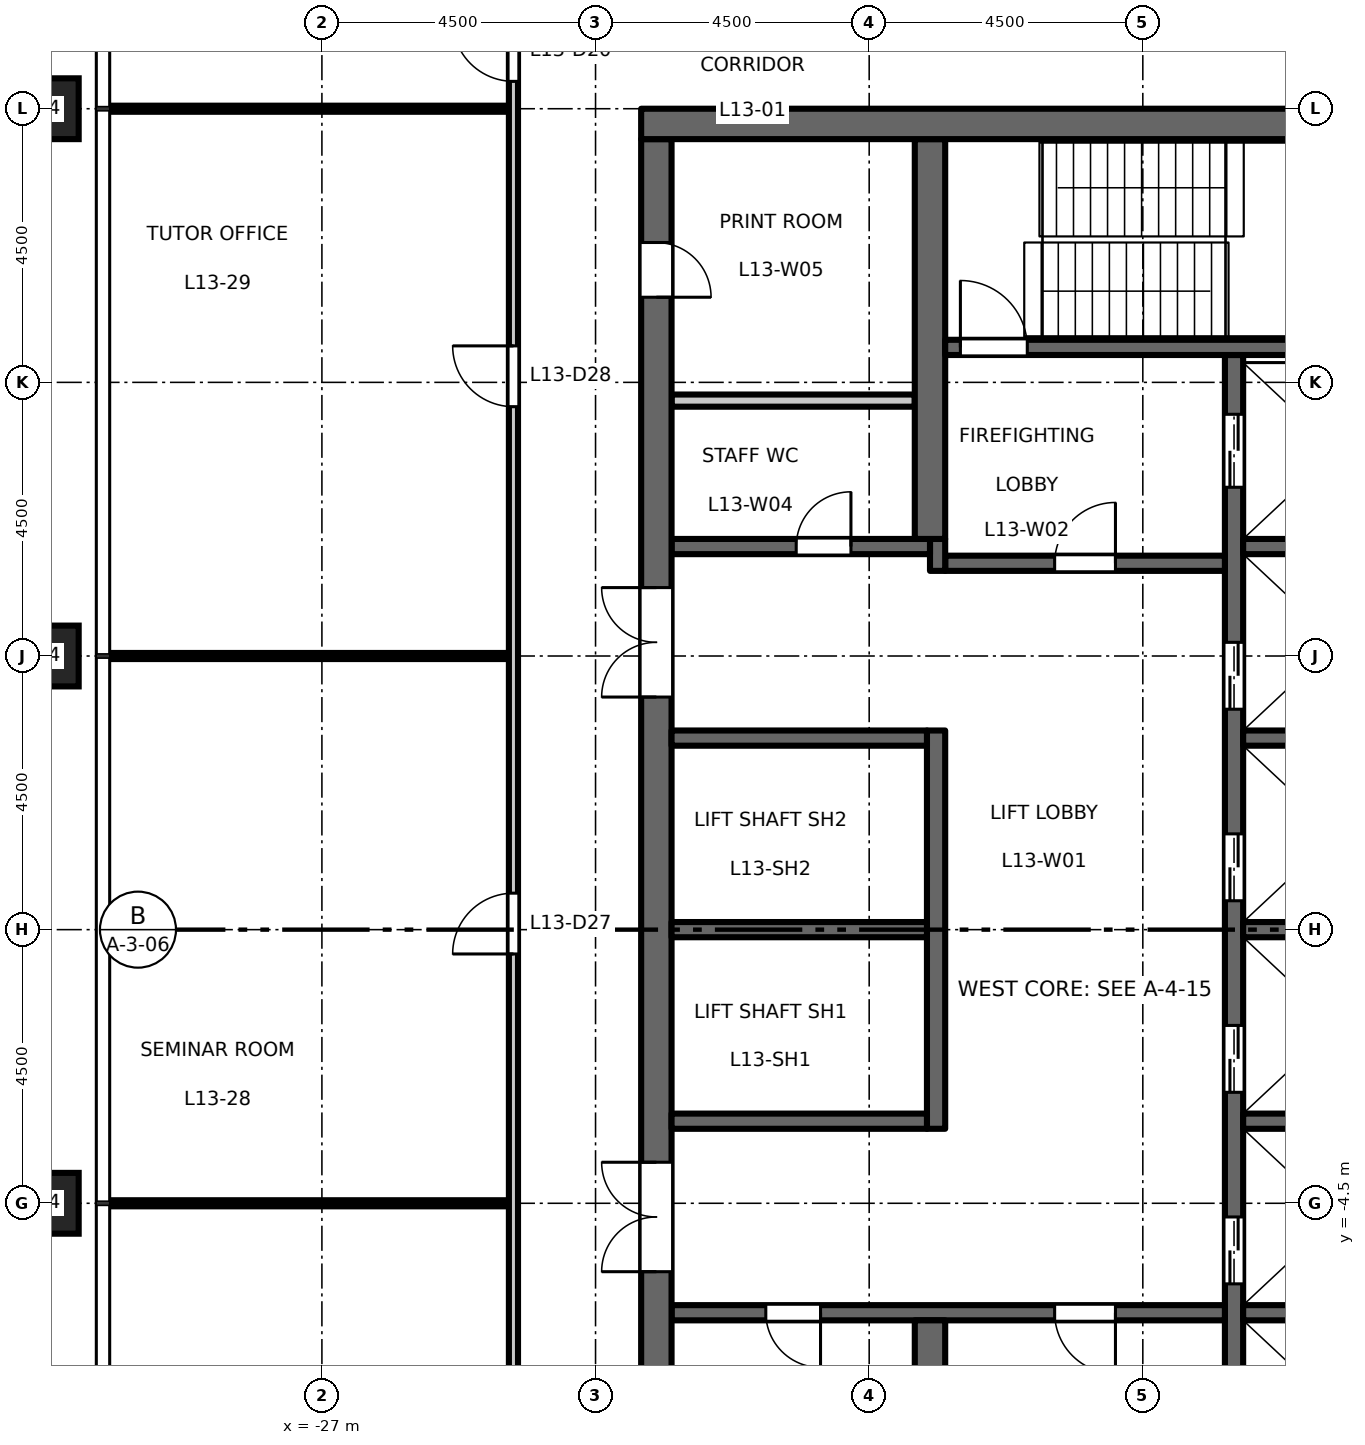
"""IFC4 building model, lengths in metres.
Left out: names, types, materials, properties, quantities, classifications, styles, units other than length and angle.
Written with IfcOpenShell. Run it as: python <this file> out.ifc"""

import sys

from ifc_helpers import new_model, si_unit, direction, frame, frame_2d, origin, origin_2d, place, context, subcontext, project, spatial, rectangle, hollow_rectangle, extrude, element, fill, save


model = new_model("IFC4")
c1 = context("Model", 3, precision=1e-05, world=origin(), true_north=direction((0.0, 1.0)))
c2 = subcontext(c1, "Body", "Model", "MODEL_VIEW")
j1 = project(units=[si_unit("LENGTHUNIT", "METRE"), si_unit("PLANEANGLEUNIT", "RADIAN")], contexts=[c1])
p1 = place(None, origin())
s1 = spatial("IfcSite", under=j1, at=p1, CompositionType="ELEMENT")
p2 = place(p1, origin())
s2 = spatial("IfcBuilding", under=s1, at=p2, CompositionType="ELEMENT")
p3 = place(p2, frame((0.0, 0.0, 62.7)))
s3 = spatial("IfcBuildingStorey", under=s2, at=p3, CompositionType="ELEMENT", Elevation=62.7)
for number, where, z_axis, x_axis in (
    (1, (-31.5, 13.5, 0.0), (0.0, 0.0, 1.0), (1.0, 0.0, 0.0)),
    (2, (-31.5, 4.5, 0.0), (0.0, 0.0, 1.0), (1.0, 0.0, 0.0)),
    (3, (-31.5, -4.5, 0.0), (0.0, 0.0, 1.0), (1.0, 0.0, 0.0)),
):
    element("IfcColumn", number, at=place(p3, frame(where, z_axis=z_axis, x_axis=x_axis)), inside=s3, PredefinedType="COLUMN", context=c2, shape_type="SweptSolid", body=[
        extrude(hollow_rectangle(XDim=1.0, YDim=1.0, WallThickness=0.06, at=origin_2d()), origin(), (0.0, 0.0, 1.0), 4.5),
    ])
p4 = place(p3, frame((-12.0, -9.45, 0.0), z_axis=(0.0, 0.0, 1.0), x_axis=(0.0, 1.0, 0.0)))
e4 = element("IfcWall", 4, at=p4, inside=s3, PredefinedType="SHEAR", context=c2, shape_type="SweptSolid", body=[
    extrude(rectangle(XDim=18.9, YDim=0.3, at=frame_2d((9.45, 0.0))), origin(), (0.0, 0.0, 1.0), 4.35),
])
p5 = place(p4, frame((3.625, 0.0, 0.0)))
e5 = element("IfcOpeningElement", 5, at=p5, cuts=e4, PredefinedType="OPENING", context=c2, shape_type="SweptSolid", body=[
    extrude(rectangle(XDim=1.1, YDim=2.1, at=frame_2d((0.55, 1.05))), frame((0.0, 0.16, 0.0), z_axis=(0.0, -1.0, 0.0), x_axis=(1.0, 0.0, 0.0)), (0.0, 0.0, 1.0), 0.32),
])
p6 = place(p4, frame((6.775, 0.0, 0.0)))
e6 = element("IfcOpeningElement", 6, at=p6, cuts=e4, PredefinedType="OPENING", context=c2, shape_type="SweptSolid", body=[
    extrude(rectangle(XDim=1.1, YDim=2.1, at=frame_2d((0.55, 1.05))), frame((0.0, 0.16, 0.0), z_axis=(0.0, -1.0, 0.0), x_axis=(1.0, 0.0, 0.0)), (0.0, 0.0, 1.0), 0.32),
])
p7 = place(p4, frame((9.925, 0.0, 0.0)))
e7 = element("IfcOpeningElement", 7, at=p7, cuts=e4, PredefinedType="OPENING", context=c2, shape_type="SweptSolid", body=[
    extrude(rectangle(XDim=1.1, YDim=2.1, at=frame_2d((0.55, 1.05))), frame((0.0, 0.16, 0.0), z_axis=(0.0, -1.0, 0.0), x_axis=(1.0, 0.0, 0.0)), (0.0, 0.0, 1.0), 0.32),
])
p8 = place(p4, frame((13.075, 0.0, 0.0)))
e8 = element("IfcOpeningElement", 8, at=p8, cuts=e4, PredefinedType="OPENING", context=c2, shape_type="SweptSolid", body=[
    extrude(rectangle(XDim=1.1, YDim=2.1, at=frame_2d((0.55, 1.05))), frame((0.0, 0.16, 0.0), z_axis=(0.0, -1.0, 0.0), x_axis=(1.0, 0.0, 0.0)), (0.0, 0.0, 1.0), 0.32),
])
p9 = place(p4, frame((16.725, 0.0, 0.0)))
e9 = element("IfcOpeningElement", 9, at=p9, cuts=e4, PredefinedType="OPENING", context=c2, shape_type="SweptSolid", body=[
    extrude(rectangle(XDim=1.2, YDim=2.1, at=frame_2d((0.6, 1.05))), frame((0.0, 0.16, 0.0), z_axis=(0.0, -1.0, 0.0), x_axis=(1.0, 0.0, 0.0)), (0.0, 0.0, 1.0), 0.32),
])
p10 = place(p4, frame((0.975, 0.0, 0.0)))
e10 = element("IfcOpeningElement", 10, at=p10, cuts=e4, PredefinedType="OPENING", context=c2, shape_type="SweptSolid", body=[
    extrude(rectangle(XDim=1.2, YDim=2.1, at=frame_2d((0.6, 1.05))), frame((0.0, 0.16, 0.0), z_axis=(0.0, -1.0, 0.0), x_axis=(1.0, 0.0, 0.0)), (0.0, 0.0, 1.0), 0.32),
])
p11 = place(p3, frame((-12.15, 6.025, 0.0), z_axis=(0.0, 0.0, 1.0), x_axis=(-1.0, 0.0, 0.0)))
e11 = element("IfcWall", 11, at=p11, inside=s3, PredefinedType="SHEAR", context=c2, shape_type="SweptSolid", body=[
    extrude(rectangle(XDim=4.6, YDim=0.25, at=frame_2d((2.3, 0.0))), origin(), (0.0, 0.0, 1.0), 4.35),
])
p12 = place(p11, frame((1.8, 0.0, 0.0)))
e12 = element("IfcOpeningElement", 12, at=p12, cuts=e11, PredefinedType="OPENING", context=c2, shape_type="SweptSolid", body=[
    extrude(rectangle(XDim=1.0, YDim=2.1, at=frame_2d((0.5, 1.05))), frame((0.0, 0.135, 0.0), z_axis=(0.0, -1.0, 0.0), x_axis=(1.0, 0.0, 0.0)), (0.0, 0.0, 1.0), 0.27),
])
p13 = place(p3, frame((-16.875, 5.9, 0.0), z_axis=(0.0, 0.0, 1.0), x_axis=(0.0, 1.0, 0.0)))
e13 = element("IfcWall", 13, at=p13, inside=s3, PredefinedType="SHEAR", context=c2, shape_type="SweptSolid", body=[
    extrude(rectangle(XDim=0.525, YDim=0.25, at=frame_2d((0.263, 0.0))), origin(), (0.0, 0.0, 1.0), 4.35),
])
p14 = place(p3, frame((-17.0, 6.3, 0.0), z_axis=(0.0, 0.0, 1.0), x_axis=(-1.0, 0.0, 0.0)))
e14 = element("IfcWall", 14, at=p14, inside=s3, PredefinedType="SHEAR", context=c2, shape_type="SweptSolid", body=[
    extrude(rectangle(XDim=4.25, YDim=0.25, at=frame_2d((2.125, 0.0))), origin(), (0.0, 0.0, 1.0), 4.35),
])
p15 = place(p14, frame((1.3, 0.0, 0.0)))
e15 = element("IfcOpeningElement", 15, at=p15, cuts=e14, PredefinedType="OPENING", context=c2, shape_type="SweptSolid", body=[
    extrude(rectangle(XDim=0.9, YDim=2.1, at=frame_2d((0.45, 1.05))), frame((0.0, 0.135, 0.0), z_axis=(0.0, -1.0, 0.0), x_axis=(1.0, 0.0, 0.0)), (0.0, 0.0, 1.0), 0.27),
])
p16 = place(p3, frame((-12.15, -6.3, 0.0), z_axis=(0.0, 0.0, 1.0), x_axis=(-1.0, 0.0, 0.0)))
e16 = element("IfcWall", 16, at=p16, inside=s3, PredefinedType="SHEAR", context=c2, shape_type="SweptSolid", body=[
    extrude(rectangle(XDim=9.1, YDim=0.25, at=frame_2d((4.55, 0.0))), origin(), (0.0, 0.0, 1.0), 4.35),
])
p17 = place(p16, frame((1.8, 0.0, 0.0)))
e17 = element("IfcOpeningElement", 17, at=p17, cuts=e16, PredefinedType="OPENING", context=c2, shape_type="SweptSolid", body=[
    extrude(rectangle(XDim=1.0, YDim=2.1, at=frame_2d((0.5, 1.05))), frame((0.0, 0.135, 0.0), z_axis=(0.0, -1.0, 0.0), x_axis=(1.0, 0.0, 0.0)), (0.0, 0.0, 1.0), 0.27),
])
p18 = place(p16, frame((6.65, 0.0, 0.0)))
e18 = element("IfcOpeningElement", 18, at=p18, cuts=e16, PredefinedType="OPENING", context=c2, shape_type="SweptSolid", body=[
    extrude(rectangle(XDim=0.9, YDim=2.1, at=frame_2d((0.45, 1.05))), frame((0.0, 0.135, 0.0), z_axis=(0.0, -1.0, 0.0), x_axis=(1.0, 0.0, 0.0)), (0.0, 0.0, 1.0), 0.27),
])
p19 = place(p3, frame((-21.5, -13.0, 0.0), z_axis=(0.0, 0.0, 1.0), x_axis=(0.0, 1.0, 0.0)))
e19 = element("IfcWall", 19, at=p19, inside=s3, PredefinedType="SHEAR", context=c2, shape_type="SweptSolid", body=[
    extrude(rectangle(XDim=26.0, YDim=0.5, at=frame_2d((13.0, 0.0))), origin(), (0.0, 0.0, 1.0), 4.35),
])
p20 = place(p19, frame((16.825, 0.0, 0.0)))
e20 = element("IfcOpeningElement", 20, at=p20, cuts=e19, PredefinedType="OPENING", context=c2, shape_type="SweptSolid", body=[
    extrude(rectangle(XDim=1.8, YDim=2.1, at=frame_2d((0.9, 1.05))), frame((0.0, 0.26, 0.0), z_axis=(0.0, -1.0, 0.0), x_axis=(1.0, 0.0, 0.0)), (0.0, 0.0, 1.0), 0.52),
])
p21 = place(p19, frame((7.375, 0.0, 0.0)))
e21 = element("IfcOpeningElement", 21, at=p21, cuts=e19, PredefinedType="OPENING", context=c2, shape_type="SweptSolid", body=[
    extrude(rectangle(XDim=1.8, YDim=2.1, at=frame_2d((0.9, 1.05))), frame((0.0, 0.26, 0.0), z_axis=(0.0, -1.0, 0.0), x_axis=(1.0, 0.0, 0.0)), (0.0, 0.0, 1.0), 0.52),
])
p22 = place(p19, frame((23.4, 0.0, 0.0)))
e22 = element("IfcOpeningElement", 22, at=p22, cuts=e19, PredefinedType="OPENING", context=c2, shape_type="SweptSolid", body=[
    extrude(rectangle(XDim=0.9, YDim=2.1, at=frame_2d((0.45, 1.05))), frame((0.0, 0.26, 0.0), z_axis=(0.0, -1.0, 0.0), x_axis=(1.0, 0.0, 0.0)), (0.0, 0.0, 1.0), 0.52),
])
p23 = place(p3, frame((-17.25, 8.7, 0.0), z_axis=(0.0, 0.0, 1.0), x_axis=(-1.0, 0.0, 0.0)))
e23 = element("IfcWall", 23, at=p23, inside=s3, PredefinedType="PARTITIONING", context=c2, shape_type="SweptSolid", body=[
    extrude(rectangle(XDim=4.0, YDim=0.2, at=frame_2d((2.0, 0.0))), origin(), (0.0, 0.0, 1.0), 4.35),
])
p24 = place(p3, frame((-16.9, -3.275, 0.0), z_axis=(0.0, 0.0, 1.0), x_axis=(0.0, 1.0, 0.0)))
e24 = element("IfcWall", 24, at=p24, inside=s3, PredefinedType="SHEAR", context=c2, shape_type="SweptSolid", body=[
    extrude(rectangle(XDim=6.55, YDim=0.3, at=frame_2d((3.275, 0.0))), origin(), (0.0, 0.0, 1.0), 4.35),
])
for number, where, z_axis, x_axis in (
    (25, (-17.05, 0.0, 0.0), (0.0, 0.0, 1.0), (-1.0, 0.0, 0.0)),
    (26, (-17.05, 3.15, 0.0), (0.0, 0.0, 1.0), (-1.0, 0.0, 0.0)),
    (27, (-17.05, -3.15, 0.0), (0.0, 0.0, 1.0), (-1.0, 0.0, 0.0)),
):
    element("IfcWall", number, at=place(p3, frame(where, z_axis=z_axis, x_axis=x_axis)), inside=s3, PredefinedType="SHEAR", context=c2, shape_type="SweptSolid", body=[
        extrude(rectangle(XDim=4.2, YDim=0.25, at=frame_2d((2.1, 0.0))), origin(), (0.0, 0.0, 1.0), 4.35),
    ])
for number, where, z_axis, x_axis in (
    (28, (-17.0, 6.425, 0.0), (0.0, 0.0, 1.0), (0.0, 1.0, 0.0)),
    (29, (-17.0, -13.0, 0.0), (0.0, 0.0, 1.0), (0.0, 1.0, 0.0)),
):
    element("IfcWall", number, at=place(p3, frame(where, z_axis=z_axis, x_axis=x_axis)), inside=s3, PredefinedType="SHEAR", context=c2, shape_type="SweptSolid", body=[
        extrude(rectangle(XDim=6.575, YDim=0.5, at=frame_2d((3.288, 0.0))), origin(), (0.0, 0.0, 1.0), 4.35),
    ])
for number, where, z_axis, x_axis in (
    (30, (-8.75, 0.0, 0.0), (0.0, 0.0, 1.0), (-1.0, 0.0, 0.0)),
    (31, (-8.75, 3.15, 0.0), (0.0, 0.0, 1.0), (-1.0, 0.0, 0.0)),
    (32, (-8.75, 6.3, 0.0), (0.0, 0.0, 1.0), (-1.0, 0.0, 0.0)),
    (33, (-8.75, -3.15, 0.0), (0.0, 0.0, 1.0), (-1.0, 0.0, 0.0)),
    (34, (-8.75, -6.3, 0.0), (0.0, 0.0, 1.0), (-1.0, 0.0, 0.0)),
):
    element("IfcWall", number, at=place(p3, frame(where, z_axis=z_axis, x_axis=x_axis)), inside=s3, PredefinedType="SHEAR", context=c2, shape_type="SweptSolid", body=[
        extrude(rectangle(XDim=3.1, YDim=0.25, at=frame_2d((1.55, 0.0))), origin(), (0.0, 0.0, 1.0), 4.35),
    ])
p25 = place(p3, frame((-8.75, 9.575, 0.0), z_axis=(0.0, 0.0, 1.0), x_axis=(-1.0, 0.0, 0.0)))
e35 = element("IfcWall", 35, at=p25, inside=s3, PredefinedType="SHEAR", context=c2, shape_type="SweptSolid", body=[
    extrude(rectangle(XDim=8.0, YDim=0.25, at=frame_2d((4.0, 0.0))), origin(), (0.0, 0.0, 1.0), 4.35),
])
p26 = place(p25, frame((6.65, 0.0, 0.0)))
e36 = element("IfcOpeningElement", 36, at=p26, cuts=e35, PredefinedType="OPENING", context=c2, shape_type="SweptSolid", body=[
    extrude(rectangle(XDim=1.1, YDim=2.1, at=frame_2d((0.55, 1.05))), frame((0.0, 0.135, 0.0), z_axis=(0.0, -1.0, 0.0), x_axis=(1.0, 0.0, 0.0)), (0.0, 0.0, 1.0), 0.27),
])
p27 = place(p3, frame((-8.25, 13.25, 0.0), z_axis=(0.0, 0.0, 1.0), x_axis=(-1.0, 0.0, 0.0)))
e37 = element("IfcWall", 37, at=p27, inside=s3, PredefinedType="SHEAR", context=c2, shape_type="SweptSolid", body=[
    extrude(rectangle(XDim=13.5, YDim=0.5, at=frame_2d((6.75, 0.0))), origin(), (0.0, 0.0, 1.0), 4.35),
])
for number, where, z_axis, x_axis in (
    (38, (-30.51, -4.5, 0.0), (0.0, 0.0, 1.0), (1.0, 0.0, 0.0)),
    (39, (-30.51, 4.5, 0.0), (0.0, 0.0, 1.0), (1.0, 0.0, 0.0)),
):
    element("IfcWall", number, at=place(p3, frame(where, z_axis=z_axis, x_axis=x_axis)), inside=s3, PredefinedType="PARTITIONING", context=c2, shape_type="SweptSolid", body=[
        extrude(rectangle(XDim=6.585, YDim=0.1, at=frame_2d((3.292, 0.0))), origin(), (0.0, 0.0, 1.0), 4.35),
    ])
p28 = place(p3, frame((-30.51, 13.5, 0.0), z_axis=(0.0, 0.0, 1.0), x_axis=(1.0, 0.0, 0.0)))
e40 = element("IfcWall", 40, at=p28, inside=s3, PredefinedType="PARTITIONING", context=c2, shape_type="SweptSolid", body=[
    extrude(rectangle(XDim=6.585, YDim=0.1, at=frame_2d((3.292, 0.0))), origin(), (0.0, 0.0, 1.0), 3.35),
])
p29 = place(p3, frame((-23.85, -15.525, 0.0), z_axis=(0.0, 0.0, 1.0), x_axis=(0.0, 1.0, 0.0)))
e41 = element("IfcWall", 41, at=p29, inside=s3, PredefinedType="PARTITIONING", context=c2, shape_type="SweptSolid", body=[
    extrude(rectangle(XDim=31.05, YDim=0.15, at=frame_2d((15.525, 0.0))), origin(), (0.0, 0.0, 1.0), 4.35),
])
p30 = place(p29, frame((29.475, 0.0, 0.0)))
e42 = element("IfcOpeningElement", 42, at=p30, cuts=e41, PredefinedType="OPENING", context=c2, shape_type="SweptSolid", body=[
    extrude(rectangle(XDim=1.0, YDim=2.1, at=frame_2d((0.5, 1.05))), frame((0.0, 0.085, 0.0), z_axis=(0.0, -1.0, 0.0), x_axis=(1.0, 0.0, 0.0)), (0.0, 0.0, 1.0), 0.17),
])
p31 = place(p29, frame((0.375, 0.0, 0.0)))
e43 = element("IfcOpeningElement", 43, at=p31, cuts=e41, PredefinedType="OPENING", context=c2, shape_type="SweptSolid", body=[
    extrude(rectangle(XDim=1.0, YDim=2.1, at=frame_2d((0.5, 1.05))), frame((0.0, 0.085, 0.0), z_axis=(0.0, -1.0, 0.0), x_axis=(1.0, 0.0, 0.0)), (0.0, 0.0, 1.0), 0.17),
])
p32 = place(p29, frame((6.125, 0.0, 0.0)))
e44 = element("IfcOpeningElement", 44, at=p32, cuts=e41, PredefinedType="OPENING", context=c2, shape_type="SweptSolid", body=[
    extrude(rectangle(XDim=1.0, YDim=2.1, at=frame_2d((0.5, 1.05))), frame((0.0, 0.085, 0.0), z_axis=(0.0, -1.0, 0.0), x_axis=(1.0, 0.0, 0.0)), (0.0, 0.0, 1.0), 0.17),
])
p33 = place(p29, frame((15.125, 0.0, 0.0)))
e45 = element("IfcOpeningElement", 45, at=p33, cuts=e41, PredefinedType="OPENING", context=c2, shape_type="SweptSolid", body=[
    extrude(rectangle(XDim=1.0, YDim=2.1, at=frame_2d((0.5, 1.05))), frame((0.0, 0.085, 0.0), z_axis=(0.0, -1.0, 0.0), x_axis=(1.0, 0.0, 0.0)), (0.0, 0.0, 1.0), 0.17),
])
p34 = place(p29, frame((24.125, 0.0, 0.0)))
e46 = element("IfcOpeningElement", 46, at=p34, cuts=e41, PredefinedType="OPENING", context=c2, shape_type="SweptSolid", body=[
    extrude(rectangle(XDim=1.0, YDim=2.1, at=frame_2d((0.5, 1.05))), frame((0.0, 0.085, 0.0), z_axis=(0.0, -1.0, 0.0), x_axis=(1.0, 0.0, 0.0)), (0.0, 0.0, 1.0), 0.17),
])
p35 = place(p12, origin())
e47 = element("IfcDoor", 47, at=p35, inside=s3, OperationType="SINGLE_SWING_LEFT", PredefinedType="DOOR", context=c2, shape_type="SweptSolid", body=[
    extrude(rectangle(XDim=1.0, YDim=2.1, at=frame_2d((0.5, 1.05))), frame((0.0, 0.025, 0.0), z_axis=(0.0, -1.0, 0.0), x_axis=(1.0, 0.0, 0.0)), (0.0, 0.0, 1.0), 0.05),
])
fill(e12, e47)
p36 = place(p17, origin())
e48 = element("IfcDoor", 48, at=p36, inside=s3, OperationType="SINGLE_SWING_RIGHT", PredefinedType="DOOR", context=c2, shape_type="SweptSolid", body=[
    extrude(rectangle(XDim=1.0, YDim=2.1, at=frame_2d((0.5, 1.05))), frame((0.0, 0.025, 0.0), z_axis=(0.0, -1.0, 0.0), x_axis=(1.0, 0.0, 0.0)), (0.0, 0.0, 1.0), 0.05),
])
fill(e17, e48)
p37 = place(p26, origin())
e49 = element("IfcDoor", 49, at=p37, inside=s3, OperationType="SINGLE_SWING_RIGHT", PredefinedType="DOOR", context=c2, shape_type="SweptSolid", body=[
    extrude(rectangle(XDim=1.1, YDim=2.1, at=frame_2d((0.55, 1.05))), frame((0.0, 0.025, 0.0), z_axis=(0.0, -1.0, 0.0), x_axis=(1.0, 0.0, 0.0)), (0.0, 0.0, 1.0), 0.05),
])
fill(e36, e49)
p38 = place(p20, origin())
e50 = element("IfcDoor", 50, at=p38, inside=s3, OperationType="DOUBLE_DOOR_DOUBLE_SWING", PredefinedType="DOOR", context=c2, shape_type="SweptSolid", body=[
    extrude(rectangle(XDim=1.8, YDim=2.1, at=frame_2d((0.9, 1.05))), frame((0.0, 0.025, 0.0), z_axis=(0.0, -1.0, 0.0), x_axis=(1.0, 0.0, 0.0)), (0.0, 0.0, 1.0), 0.05),
])
fill(e20, e50)
p39 = place(p21, origin())
e51 = element("IfcDoor", 51, at=p39, inside=s3, OperationType="DOUBLE_DOOR_DOUBLE_SWING", PredefinedType="DOOR", context=c2, shape_type="SweptSolid", body=[
    extrude(rectangle(XDim=1.8, YDim=2.1, at=frame_2d((0.9, 1.05))), frame((0.0, 0.025, 0.0), z_axis=(0.0, -1.0, 0.0), x_axis=(1.0, 0.0, 0.0)), (0.0, 0.0, 1.0), 0.05),
])
fill(e21, e51)
p40 = place(p5, origin())
e52 = element("IfcDoor", 52, at=p40, inside=s3, OperationType="DOUBLE_DOOR_SLIDING", PredefinedType="DOOR", context=c2, shape_type="SweptSolid", body=[
    extrude(rectangle(XDim=1.1, YDim=2.1, at=frame_2d((0.55, 1.05))), frame((0.0, 0.025, 0.0), z_axis=(0.0, -1.0, 0.0), x_axis=(1.0, 0.0, 0.0)), (0.0, 0.0, 1.0), 0.05),
])
fill(e5, e52)
p41 = place(p6, origin())
e53 = element("IfcDoor", 53, at=p41, inside=s3, OperationType="DOUBLE_DOOR_SLIDING", PredefinedType="DOOR", context=c2, shape_type="SweptSolid", body=[
    extrude(rectangle(XDim=1.1, YDim=2.1, at=frame_2d((0.55, 1.05))), frame((0.0, 0.025, 0.0), z_axis=(0.0, -1.0, 0.0), x_axis=(1.0, 0.0, 0.0)), (0.0, 0.0, 1.0), 0.05),
])
fill(e6, e53)
p42 = place(p7, origin())
e54 = element("IfcDoor", 54, at=p42, inside=s3, OperationType="DOUBLE_DOOR_SLIDING", PredefinedType="DOOR", context=c2, shape_type="SweptSolid", body=[
    extrude(rectangle(XDim=1.1, YDim=2.1, at=frame_2d((0.55, 1.05))), frame((0.0, 0.025, 0.0), z_axis=(0.0, -1.0, 0.0), x_axis=(1.0, 0.0, 0.0)), (0.0, 0.0, 1.0), 0.05),
])
fill(e7, e54)
p43 = place(p8, origin())
e55 = element("IfcDoor", 55, at=p43, inside=s3, OperationType="DOUBLE_DOOR_SLIDING", PredefinedType="DOOR", context=c2, shape_type="SweptSolid", body=[
    extrude(rectangle(XDim=1.1, YDim=2.1, at=frame_2d((0.55, 1.05))), frame((0.0, 0.025, 0.0), z_axis=(0.0, -1.0, 0.0), x_axis=(1.0, 0.0, 0.0)), (0.0, 0.0, 1.0), 0.05),
])
fill(e8, e55)
p44 = place(p9, origin())
e56 = element("IfcDoor", 56, at=p44, inside=s3, OperationType="DOUBLE_DOOR_SLIDING", PredefinedType="DOOR", context=c2, shape_type="SweptSolid", body=[
    extrude(rectangle(XDim=1.2, YDim=2.1, at=frame_2d((0.6, 1.05))), frame((0.0, 0.025, 0.0), z_axis=(0.0, -1.0, 0.0), x_axis=(1.0, 0.0, 0.0)), (0.0, 0.0, 1.0), 0.05),
])
fill(e9, e56)
p45 = place(p15, origin())
e57 = element("IfcDoor", 57, at=p45, inside=s3, OperationType="SINGLE_SWING_LEFT", PredefinedType="DOOR", context=c2, shape_type="SweptSolid", body=[
    extrude(rectangle(XDim=0.9, YDim=2.1, at=frame_2d((0.45, 1.05))), frame((0.0, 0.025, 0.0), z_axis=(0.0, -1.0, 0.0), x_axis=(1.0, 0.0, 0.0)), (0.0, 0.0, 1.0), 0.05),
])
fill(e15, e57)
p46 = place(p22, origin())
e58 = element("IfcDoor", 58, at=p46, inside=s3, OperationType="SINGLE_SWING_LEFT", PredefinedType="DOOR", context=c2, shape_type="SweptSolid", body=[
    extrude(rectangle(XDim=0.9, YDim=2.1, at=frame_2d((0.45, 1.05))), frame((0.0, 0.025, 0.0), z_axis=(0.0, -1.0, 0.0), x_axis=(1.0, 0.0, 0.0)), (0.0, 0.0, 1.0), 0.05),
])
fill(e22, e58)
p47 = place(p18, origin())
e59 = element("IfcDoor", 59, at=p47, inside=s3, OperationType="SINGLE_SWING_RIGHT", PredefinedType="DOOR", context=c2, shape_type="SweptSolid", body=[
    extrude(rectangle(XDim=0.9, YDim=2.1, at=frame_2d((0.45, 1.05))), frame((0.0, 0.025, 0.0), z_axis=(0.0, -1.0, 0.0), x_axis=(1.0, 0.0, 0.0)), (0.0, 0.0, 1.0), 0.05),
])
fill(e18, e59)
p48 = place(p30, origin())
e60 = element("IfcDoor", 60, at=p48, inside=s3, OperationType="SINGLE_SWING_RIGHT", PredefinedType="DOOR", context=c2, shape_type="SweptSolid", body=[
    extrude(rectangle(XDim=1.0, YDim=2.1, at=frame_2d((0.5, 1.05))), frame((0.0, 0.025, 0.0), z_axis=(0.0, -1.0, 0.0), x_axis=(1.0, 0.0, 0.0)), (0.0, 0.0, 1.0), 0.05),
])
fill(e42, e60)
p49 = place(p33, origin())
e61 = element("IfcDoor", 61, at=p49, inside=s3, OperationType="SINGLE_SWING_LEFT", PredefinedType="DOOR", context=c2, shape_type="SweptSolid", body=[
    extrude(rectangle(XDim=1.0, YDim=2.1, at=frame_2d((0.5, 1.05))), frame((0.0, 0.025, 0.0), z_axis=(0.0, -1.0, 0.0), x_axis=(1.0, 0.0, 0.0)), (0.0, 0.0, 1.0), 0.05),
])
fill(e45, e61)
p50 = place(p34, origin())
e62 = element("IfcDoor", 62, at=p50, inside=s3, OperationType="SINGLE_SWING_RIGHT", PredefinedType="DOOR", context=c2, shape_type="SweptSolid", body=[
    extrude(rectangle(XDim=1.0, YDim=2.1, at=frame_2d((0.5, 1.05))), frame((0.0, 0.025, 0.0), z_axis=(0.0, -1.0, 0.0), x_axis=(1.0, 0.0, 0.0)), (0.0, 0.0, 1.0), 0.05),
])
fill(e46, e62)
save(model, sys.argv[1])
